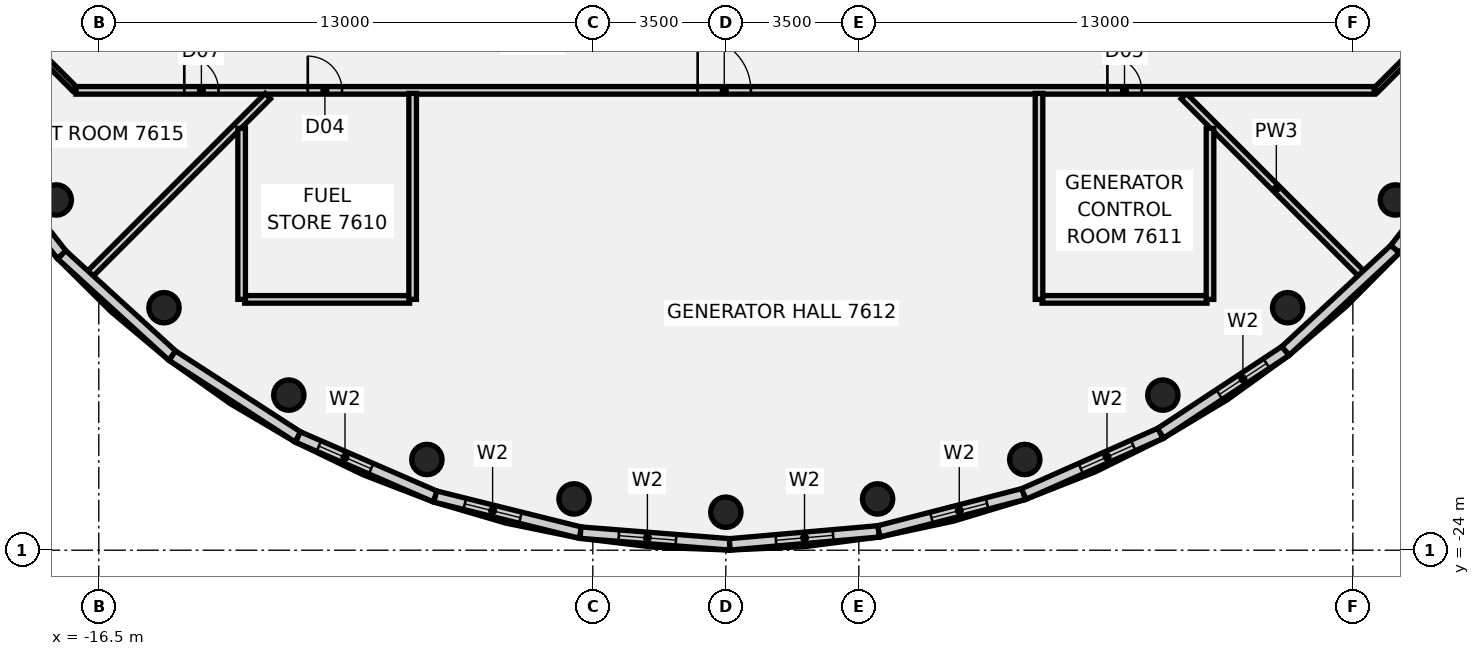
"""IFC4 building model, lengths in metres.
Left out: names, types, materials, properties, quantities, classifications, styles, units other than length and angle.
Written with IfcOpenShell. Run it as: python <this file> out.ifc"""

import sys

from ifc_helpers import new_model, si_unit, direction, frame, frame_2d, origin, origin_2d, place, context, subcontext, project, spatial, rectangle, circle, extrude, element, fill, save


model = new_model("IFC4")
c1 = context("Model", 3, precision=1e-05, world=origin(), true_north=direction((0.0, 1.0)))
c2 = subcontext(c1, "Body", "Model", "MODEL_VIEW")
j1 = project(units=[si_unit("LENGTHUNIT", "METRE"), si_unit("PLANEANGLEUNIT", "RADIAN")], contexts=[c1])
p1 = place(None, origin())
s1 = spatial("IfcSite", under=j1, at=p1, CompositionType="ELEMENT")
p2 = place(p1, origin())
s2 = spatial("IfcBuilding", under=s1, at=p2, CompositionType="ELEMENT")
p3 = place(p2, frame((0.0, 0.0, 309.4)))
s3 = spatial("IfcBuildingStorey", under=s2, at=p3, CompositionType="ELEMENT", Elevation=309.4)
for number, where, z_axis, x_axis in (
    (1, (-17.619, -14.784, -0.18), (0.0, 0.0, 1.0), (1.0, 0.0, 0.0)),
    (2, (-14.784, -17.619, -0.18), (0.0, 0.0, 1.0), (1.0, 0.0, 0.0)),
    (3, (-11.5, -19.919, -0.18), (0.0, 0.0, 1.0), (1.0, 0.0, 0.0)),
    (4, (-7.866, -21.613, -0.18), (0.0, 0.0, 1.0), (1.0, 0.0, 0.0)),
    (5, (-3.994, -22.651, -0.18), (0.0, 0.0, 1.0), (1.0, 0.0, 0.0)),
    (6, (0.0, -23.0, -0.18), (0.0, 0.0, 1.0), (1.0, 0.0, 0.0)),
    (7, (3.994, -22.651, -0.18), (0.0, 0.0, 1.0), (1.0, 0.0, 0.0)),
    (8, (7.866, -21.613, -0.18), (0.0, 0.0, 1.0), (1.0, 0.0, 0.0)),
    (9, (11.5, -19.919, -0.18), (0.0, 0.0, 1.0), (1.0, 0.0, 0.0)),
    (10, (14.784, -17.619, -0.18), (0.0, 0.0, 1.0), (1.0, 0.0, 0.0)),
    (11, (17.619, -14.784, -0.18), (0.0, 0.0, 1.0), (1.0, 0.0, 0.0)),
):
    element("IfcColumn", number, at=place(p3, frame(where, z_axis=z_axis, x_axis=x_axis)), inside=s3, PredefinedType="COLUMN", context=c2, shape_type="SweptSolid", body=[
        extrude(circle(Radius=0.4, at=origin_2d()), origin(), (0.0, 0.0, 1.0), 4.0),
    ])
p4 = place(p3, frame((-18.872, -10.128, 0.0), z_axis=(0.0, 0.0, 1.0), x_axis=(0.707106781187, -0.707106781187, 0.0)))
e12 = element("IfcWall", 12, at=p4, inside=s3, PredefinedType="PARTITIONING", context=c2, shape_type="SweptSolid", body=[
    extrude(rectangle(XDim=2.455, YDim=0.15, at=frame_2d((1.228, 0.0))), origin(), (0.0, 0.0, 1.0), 3.22),
])
p5 = place(p3, frame((12.052, -12.052, 0.0), z_axis=(0.0, 0.0, 1.0), x_axis=(0.707106781187, -0.707106781187, 0.0)))
e13 = element("IfcWall", 13, at=p5, inside=s3, PredefinedType="PARTITIONING", context=c2, shape_type="SweptSolid", body=[
    extrude(rectangle(XDim=6.886, YDim=0.2, at=frame_2d((3.443, 0.0))), origin(), (0.0, 0.0, 1.0), 3.22),
])
p6 = place(p3, frame((-17.1, -11.9, 0.0), z_axis=(0.0, 0.0, 1.0), x_axis=(1.0, 0.0, 0.0)))
e14 = element("IfcWall", 14, at=p6, inside=s3, PredefinedType="PARTITIONING", context=c2, shape_type="SweptSolid", body=[
    extrude(rectangle(XDim=34.165, YDim=0.2, at=frame_2d((17.083, 0.0))), origin(), (0.0, 0.0, 1.0), 3.22),
])
p7 = place(p6, frame((6.1, 0.0, 0.0)))
e15 = element("IfcOpeningElement", 15, at=p7, cuts=e14, PredefinedType="OPENING", context=c2, shape_type="SweptSolid", body=[
    extrude(rectangle(XDim=0.9, YDim=2.1, at=frame_2d((0.45, 1.05))), frame((0.0, 0.11, 0.0), z_axis=(0.0, -1.0, 0.0), x_axis=(1.0, 0.0, 0.0)), (0.0, 0.0, 1.0), 0.22),
])
p8 = place(p6, frame((27.141, 0.0, 0.0)))
e16 = element("IfcOpeningElement", 16, at=p8, cuts=e14, PredefinedType="OPENING", context=c2, shape_type="SweptSolid", body=[
    extrude(rectangle(XDim=0.9, YDim=2.1, at=frame_2d((0.45, 1.05))), frame((0.0, 0.11, 0.0), z_axis=(0.0, -1.0, 0.0), x_axis=(1.0, 0.0, 0.0)), (0.0, 0.0, 1.0), 0.22),
])
p9 = place(p6, frame((16.359, 0.0, 0.0)))
e17 = element("IfcOpeningElement", 17, at=p9, cuts=e14, PredefinedType="OPENING", context=c2, shape_type="SweptSolid", body=[
    extrude(rectangle(XDim=1.4, YDim=2.1, at=frame_2d((0.7, 1.05))), frame((0.0, 0.11, 0.0), z_axis=(0.0, -1.0, 0.0), x_axis=(1.0, 0.0, 0.0)), (0.0, 0.0, 1.0), 0.22),
])
p10 = place(p6, frame((2.85, 0.0, 0.0)))
e18 = element("IfcOpeningElement", 18, at=p10, cuts=e14, PredefinedType="OPENING", context=c2, shape_type="SweptSolid", body=[
    extrude(rectangle(XDim=0.9, YDim=2.1, at=frame_2d((0.45, 1.05))), frame((0.0, 0.11, 0.0), z_axis=(0.0, -1.0, 0.0), x_axis=(1.0, 0.0, 0.0)), (0.0, 0.0, 1.0), 0.22),
])
for number, where, z_axis, x_axis in (
    (19, (-12.661, -17.4, 0.0), (0.0, 0.0, 1.0), (1.0, 0.0, 0.0)),
    (20, (8.321, -17.4, 0.0), (0.0, 0.0, 1.0), (1.0, 0.0, 0.0)),
):
    element("IfcWall", number, at=place(p3, frame(where, z_axis=z_axis, x_axis=x_axis)), inside=s3, PredefinedType="PARTITIONING", context=c2, shape_type="SweptSolid", body=[
        extrude(rectangle(XDim=4.34, YDim=0.2, at=frame_2d((2.17, 0.0))), origin(), (0.0, 0.0, 1.0), 3.22),
    ])
p11 = place(p3, frame((-16.927, -16.927, 0.0), z_axis=(0.0, 0.0, 1.0), x_axis=(0.707106781187, 0.707106781187, 0.0)))
e21 = element("IfcWall", 21, at=p11, inside=s3, PredefinedType="PARTITIONING", context=c2, shape_type="SweptSolid", body=[
    extrude(rectangle(XDim=6.894, YDim=0.2, at=frame_2d((3.447, 0.0))), origin(), (0.0, 0.0, 1.0), 3.22),
])
p12 = place(p3, frame((17.1, -11.9, 0.0), z_axis=(0.0, 0.0, 1.0), x_axis=(0.707106781187, 0.707106781187, 0.0)))
e22 = element("IfcWall", 22, at=p12, inside=s3, PredefinedType="PARTITIONING", context=c2, shape_type="SweptSolid", body=[
    extrude(rectangle(XDim=2.505, YDim=0.15, at=frame_2d((1.253, 0.0))), origin(), (0.0, 0.0, 1.0), 3.22),
])
p13 = place(p3, frame((-12.741, -17.4, 0.0), z_axis=(0.0, 0.0, 1.0), x_axis=(0.0, 1.0, 0.0)))
e23 = element("IfcWall", 23, at=p13, inside=s3, PredefinedType="PARTITIONING", context=c2, shape_type="SweptSolid", body=[
    extrude(rectangle(XDim=4.499, YDim=0.2, at=frame_2d((2.25, 0.0))), origin(), (0.0, 0.0, 1.0), 3.22),
])
for number, where, z_axis, x_axis in (
    (24, (-8.241, -17.4, 0.0), (0.0, 0.0, 1.0), (0.0, 1.0, 0.0)),
    (25, (8.241, -17.4, 0.0), (0.0, 0.0, 1.0), (0.0, 1.0, 0.0)),
):
    element("IfcWall", number, at=place(p3, frame(where, z_axis=z_axis, x_axis=x_axis)), inside=s3, PredefinedType="PARTITIONING", context=c2, shape_type="SweptSolid", body=[
        extrude(rectangle(XDim=5.42, YDim=0.2, at=frame_2d((2.71, 0.0))), origin(), (0.0, 0.0, 1.0), 3.22),
    ])
p14 = place(p3, frame((12.741, -17.4, 0.0), z_axis=(0.0, 0.0, 1.0), x_axis=(0.0, 1.0, 0.0)))
e26 = element("IfcWall", 26, at=p14, inside=s3, PredefinedType="PARTITIONING", context=c2, shape_type="SweptSolid", body=[
    extrude(rectangle(XDim=4.499, YDim=0.2, at=frame_2d((2.25, 0.0))), origin(), (0.0, 0.0, 1.0), 3.22),
])
p15 = place(p3, frame((-19.906, -13.128, 0.0), z_axis=(0.0, 0.0, 1.0), x_axis=(0.617577851206, -0.786509756901, 0.0)))
e27 = element("IfcWall", 27, at=p15, inside=s3, PredefinedType="SOLIDWALL", context=c2, shape_type="SweptSolid", body=[
    extrude(rectangle(XDim=3.938, YDim=0.3, at=frame_2d((1.969, 0.0))), origin(), (0.0, 0.0, 1.0), 3.82),
])
p16 = place(p3, frame((-17.474, -16.226, 0.0), z_axis=(0.0, 0.0, 1.0), x_axis=(0.738634435884, -0.674106200926, 0.0)))
e28 = element("IfcWall", 28, at=p16, inside=s3, PredefinedType="SOLIDWALL", context=c2, shape_type="SweptSolid", body=[
    extrude(rectangle(XDim=3.938, YDim=0.3, at=frame_2d((1.969, 0.0))), origin(), (0.0, 0.0, 1.0), 3.82),
])
p17 = place(p3, frame((-14.565, -18.881, 0.0), z_axis=(0.0, 0.0, 1.0), x_axis=(0.839498632024, -0.54336180104, 0.0)))
e29 = element("IfcWall", 29, at=p17, inside=s3, PredefinedType="SOLIDWALL", context=c2, shape_type="SweptSolid", body=[
    extrude(rectangle(XDim=3.938, YDim=0.3, at=frame_2d((1.969, 0.0))), origin(), (0.0, 0.0, 1.0), 3.82),
])
p18 = place(p3, frame((-11.259, -21.021, 0.0), z_axis=(0.0, 0.0, 1.0), x_axis=(0.917505110173, -0.397723990735, 0.0)))
e30 = element("IfcWall", 30, at=p18, inside=s3, PredefinedType="SOLIDWALL", context=c2, shape_type="SweptSolid", body=[
    extrude(rectangle(XDim=3.938, YDim=0.3, at=frame_2d((1.969, 0.0))), origin(), (0.0, 0.0, 1.0), 3.82),
])
p19 = place(p18, frame((0.6, 0.0, 1.4)))
e31 = element("IfcOpeningElement", 31, at=p19, cuts=e30, PredefinedType="OPENING", context=c2, shape_type="SweptSolid", body=[
    extrude(rectangle(XDim=1.498, YDim=2.12, at=frame_2d((0.749, 1.06))), frame((0.0, 0.16, 0.0), z_axis=(0.0, -1.0, 0.0), x_axis=(1.0, 0.0, 0.0)), (0.0, 0.0, 1.0), 0.32),
])
p20 = place(p3, frame((-7.646, -22.587, 0.0), z_axis=(0.0, 0.0, 1.0), x_axis=(0.970440788586, -0.241339337547, 0.0)))
e32 = element("IfcWall", 32, at=p20, inside=s3, PredefinedType="SOLIDWALL", context=c2, shape_type="SweptSolid", body=[
    extrude(rectangle(XDim=3.938, YDim=0.3, at=frame_2d((1.969, 0.0))), origin(), (0.0, 0.0, 1.0), 3.82),
])
p21 = place(p20, frame((0.801, 0.0, 1.4)))
e33 = element("IfcOpeningElement", 33, at=p21, cuts=e32, PredefinedType="OPENING", context=c2, shape_type="SweptSolid", body=[
    extrude(rectangle(XDim=1.509, YDim=2.12, at=frame_2d((0.754, 1.06))), frame((0.0, 0.16, 0.0), z_axis=(0.0, -1.0, 0.0), x_axis=(1.0, 0.0, 0.0)), (0.0, 0.0, 1.0), 0.32),
])
p22 = place(p3, frame((-3.824, -23.537, 0.0), z_axis=(0.0, 0.0, 1.0), x_axis=(0.996930318741, -0.078293930641, 0.0)))
e34 = element("IfcWall", 34, at=p22, inside=s3, PredefinedType="SOLIDWALL", context=c2, shape_type="SweptSolid", body=[
    extrude(rectangle(XDim=3.938, YDim=0.3, at=frame_2d((1.969, 0.0))), origin(), (0.0, 0.0, 1.0), 3.82),
])
p23 = place(p22, frame((1.011, 0.0, 1.4)))
e35 = element("IfcOpeningElement", 35, at=p23, cuts=e34, PredefinedType="OPENING", context=c2, shape_type="SweptSolid", body=[
    extrude(rectangle(XDim=1.509, YDim=2.12, at=frame_2d((0.754, 1.06))), frame((0.0, 0.16, 0.0), z_axis=(0.0, -1.0, 0.0), x_axis=(1.0, 0.0, 0.0)), (0.0, 0.0, 1.0), 0.32),
])
p24 = place(p3, frame((0.103, -23.846, 0.0), z_axis=(0.0, 0.0, 1.0), x_axis=(0.99621635874, 0.08690780505, 0.0)))
e36 = element("IfcWall", 36, at=p24, inside=s3, PredefinedType="SOLIDWALL", context=c2, shape_type="SweptSolid", body=[
    extrude(rectangle(XDim=3.938, YDim=0.3, at=frame_2d((1.969, 0.0))), origin(), (0.0, 0.0, 1.0), 3.82),
])
p25 = place(p24, frame((1.221, 0.0, 1.4)))
e37 = element("IfcOpeningElement", 37, at=p25, cuts=e36, PredefinedType="OPENING", context=c2, shape_type="SweptSolid", body=[
    extrude(rectangle(XDim=1.509, YDim=2.12, at=frame_2d((0.755, 1.06))), frame((0.0, 0.16, 0.0), z_axis=(0.0, -1.0, 0.0), x_axis=(1.0, 0.0, 0.0)), (0.0, 0.0, 1.0), 0.32),
])
p26 = place(p3, frame((4.026, -23.503, 0.0), z_axis=(0.0, 0.0, 1.0), x_axis=(0.968336809904, 0.24964739651, 0.0)))
e38 = element("IfcWall", 38, at=p26, inside=s3, PredefinedType="SOLIDWALL", context=c2, shape_type="SweptSolid", body=[
    extrude(rectangle(XDim=3.938, YDim=0.3, at=frame_2d((1.969, 0.0))), origin(), (0.0, 0.0, 1.0), 3.82),
])
p27 = place(p26, frame((1.432, 0.0, 1.4)))
e39 = element("IfcOpeningElement", 39, at=p27, cuts=e38, PredefinedType="OPENING", context=c2, shape_type="SweptSolid", body=[
    extrude(rectangle(XDim=1.509, YDim=2.12, at=frame_2d((0.754, 1.06))), frame((0.0, 0.16, 0.0), z_axis=(0.0, -1.0, 0.0), x_axis=(1.0, 0.0, 0.0)), (0.0, 0.0, 1.0), 0.32),
])
p28 = place(p3, frame((7.84, -22.52, 0.0), z_axis=(0.0, 0.0, 1.0), x_axis=(0.91404912862, 0.405603489221, 0.0)))
e40 = element("IfcWall", 40, at=p28, inside=s3, PredefinedType="SOLIDWALL", context=c2, shape_type="SweptSolid", body=[
    extrude(rectangle(XDim=3.938, YDim=0.3, at=frame_2d((1.969, 0.0))), origin(), (0.0, 0.0, 1.0), 3.82),
])
p29 = place(p28, frame((1.643, 0.0, 1.4)))
e41 = element("IfcOpeningElement", 41, at=p29, cuts=e40, PredefinedType="OPENING", context=c2, shape_type="SweptSolid", body=[
    extrude(rectangle(XDim=1.509, YDim=2.12, at=frame_2d((0.754, 1.06))), frame((0.0, 0.16, 0.0), z_axis=(0.0, -1.0, 0.0), x_axis=(1.0, 0.0, 0.0)), (0.0, 0.0, 1.0), 0.32),
])
p30 = place(p3, frame((11.439, -20.923, 0.0), z_axis=(0.0, 0.0, 1.0), x_axis=(0.834786621205, 0.550573607302, 0.0)))
e42 = element("IfcWall", 42, at=p30, inside=s3, PredefinedType="SOLIDWALL", context=c2, shape_type="SweptSolid", body=[
    extrude(rectangle(XDim=3.938, YDim=0.3, at=frame_2d((1.969, 0.0))), origin(), (0.0, 0.0, 1.0), 3.82),
])
p31 = place(p30, frame((1.853, 0.0, 1.4)))
e43 = element("IfcOpeningElement", 43, at=p31, cuts=e42, PredefinedType="OPENING", context=c2, shape_type="SweptSolid", body=[
    extrude(rectangle(XDim=1.485, YDim=2.12, at=frame_2d((0.743, 1.06))), frame((0.0, 0.16, 0.0), z_axis=(0.0, -1.0, 0.0), x_axis=(1.0, 0.0, 0.0)), (0.0, 0.0, 1.0), 0.32),
])
p32 = place(p3, frame((14.727, -18.754, 0.0), z_axis=(0.0, 0.0, 1.0), x_axis=(0.732813362883, 0.680429698926, 0.0)))
e44 = element("IfcWall", 44, at=p32, inside=s3, PredefinedType="SOLIDWALL", context=c2, shape_type="SweptSolid", body=[
    extrude(rectangle(XDim=3.938, YDim=0.3, at=frame_2d((1.969, 0.0))), origin(), (0.0, 0.0, 1.0), 3.82),
])
p33 = place(p3, frame((17.613, -16.075, 0.0), z_axis=(0.0, 0.0, 1.0), x_axis=(0.610785688376, 0.79179596038, 0.0)))
e45 = element("IfcWall", 45, at=p33, inside=s3, PredefinedType="SOLIDWALL", context=c2, shape_type="SweptSolid", body=[
    extrude(rectangle(XDim=3.938, YDim=0.3, at=frame_2d((1.969, 0.0))), origin(), (0.0, 0.0, 1.0), 3.82),
])
p34 = place(p7, frame((0.9, 0.0, 0.0), z_axis=(0.0, 0.0, 1.0), x_axis=(-1.0, 0.0, 0.0)))
e46 = element("IfcDoor", 46, at=p34, inside=s3, OperationType="SINGLE_SWING_LEFT", PredefinedType="DOOR", context=c2, shape_type="SweptSolid", body=[
    extrude(rectangle(XDim=0.9, YDim=2.1, at=frame_2d((0.45, 1.05))), frame((0.0, 0.025, 0.0), z_axis=(0.0, -1.0, 0.0), x_axis=(1.0, 0.0, 0.0)), (0.0, 0.0, 1.0), 0.05),
])
fill(e15, e46)
p35 = place(p8, frame((0.9, 0.0, 0.0), z_axis=(0.0, 0.0, 1.0), x_axis=(-1.0, 0.0, 0.0)))
e47 = element("IfcDoor", 47, at=p35, inside=s3, OperationType="SINGLE_SWING_RIGHT", PredefinedType="DOOR", context=c2, shape_type="SweptSolid", body=[
    extrude(rectangle(XDim=0.9, YDim=2.1, at=frame_2d((0.45, 1.05))), frame((0.0, 0.025, 0.0), z_axis=(0.0, -1.0, 0.0), x_axis=(1.0, 0.0, 0.0)), (0.0, 0.0, 1.0), 0.05),
])
fill(e16, e47)
p36 = place(p9, frame((1.4, 0.0, 0.0), z_axis=(0.0, 0.0, 1.0), x_axis=(-1.0, 0.0, 0.0)))
e48 = element("IfcDoor", 48, at=p36, inside=s3, OperationType="DOUBLE_DOOR_SINGLE_SWING", PredefinedType="DOOR", context=c2, shape_type="SweptSolid", body=[
    extrude(rectangle(XDim=1.4, YDim=2.1, at=frame_2d((0.7, 1.05))), frame((0.0, 0.025, 0.0), z_axis=(0.0, -1.0, 0.0), x_axis=(1.0, 0.0, 0.0)), (0.0, 0.0, 1.0), 0.05),
])
fill(e17, e48)
p37 = place(p10, frame((0.9, 0.0, 0.0), z_axis=(0.0, 0.0, 1.0), x_axis=(-1.0, 0.0, 0.0)))
e49 = element("IfcDoor", 49, at=p37, inside=s3, OperationType="SINGLE_SWING_LEFT", PredefinedType="DOOR", context=c2, shape_type="SweptSolid", body=[
    extrude(rectangle(XDim=0.9, YDim=2.1, at=frame_2d((0.45, 1.05))), frame((0.0, 0.025, 0.0), z_axis=(0.0, -1.0, 0.0), x_axis=(1.0, 0.0, 0.0)), (0.0, 0.0, 1.0), 0.05),
])
fill(e18, e49)
p38 = place(p19, origin())
e50 = element("IfcWindow", 50, at=p38, inside=s3, PartitioningType="SINGLE_PANEL", PredefinedType="WINDOW", context=c2, shape_type="SweptSolid", body=[
    extrude(rectangle(XDim=1.498, YDim=2.12, at=frame_2d((0.749, 1.06))), frame((0.0, 0.03, 0.0), z_axis=(0.0, -1.0, 0.0), x_axis=(1.0, 0.0, 0.0)), (0.0, 0.0, 1.0), 0.06),
])
fill(e31, e50)
p39 = place(p21, origin())
e51 = element("IfcWindow", 51, at=p39, inside=s3, PartitioningType="SINGLE_PANEL", PredefinedType="WINDOW", context=c2, shape_type="SweptSolid", body=[
    extrude(rectangle(XDim=1.509, YDim=2.12, at=frame_2d((0.754, 1.06))), frame((0.0, 0.03, 0.0), z_axis=(0.0, -1.0, 0.0), x_axis=(1.0, 0.0, 0.0)), (0.0, 0.0, 1.0), 0.06),
])
fill(e33, e51)
p40 = place(p23, origin())
e52 = element("IfcWindow", 52, at=p40, inside=s3, PartitioningType="SINGLE_PANEL", PredefinedType="WINDOW", context=c2, shape_type="SweptSolid", body=[
    extrude(rectangle(XDim=1.509, YDim=2.12, at=frame_2d((0.754, 1.06))), frame((0.0, 0.03, 0.0), z_axis=(0.0, -1.0, 0.0), x_axis=(1.0, 0.0, 0.0)), (0.0, 0.0, 1.0), 0.06),
])
fill(e35, e52)
p41 = place(p25, origin())
e53 = element("IfcWindow", 53, at=p41, inside=s3, PartitioningType="SINGLE_PANEL", PredefinedType="WINDOW", context=c2, shape_type="SweptSolid", body=[
    extrude(rectangle(XDim=1.509, YDim=2.12, at=frame_2d((0.755, 1.06))), frame((0.0, 0.03, 0.0), z_axis=(0.0, -1.0, 0.0), x_axis=(1.0, 0.0, 0.0)), (0.0, 0.0, 1.0), 0.06),
])
fill(e37, e53)
p42 = place(p27, origin())
e54 = element("IfcWindow", 54, at=p42, inside=s3, PartitioningType="SINGLE_PANEL", PredefinedType="WINDOW", context=c2, shape_type="SweptSolid", body=[
    extrude(rectangle(XDim=1.509, YDim=2.12, at=frame_2d((0.754, 1.06))), frame((0.0, 0.03, 0.0), z_axis=(0.0, -1.0, 0.0), x_axis=(1.0, 0.0, 0.0)), (0.0, 0.0, 1.0), 0.06),
])
fill(e39, e54)
p43 = place(p29, origin())
e55 = element("IfcWindow", 55, at=p43, inside=s3, PartitioningType="SINGLE_PANEL", PredefinedType="WINDOW", context=c2, shape_type="SweptSolid", body=[
    extrude(rectangle(XDim=1.509, YDim=2.12, at=frame_2d((0.754, 1.06))), frame((0.0, 0.03, 0.0), z_axis=(0.0, -1.0, 0.0), x_axis=(1.0, 0.0, 0.0)), (0.0, 0.0, 1.0), 0.06),
])
fill(e41, e55)
p44 = place(p31, origin())
e56 = element("IfcWindow", 56, at=p44, inside=s3, PartitioningType="SINGLE_PANEL", PredefinedType="WINDOW", context=c2, shape_type="SweptSolid", body=[
    extrude(rectangle(XDim=1.485, YDim=2.12, at=frame_2d((0.743, 1.06))), frame((0.0, 0.03, 0.0), z_axis=(0.0, -1.0, 0.0), x_axis=(1.0, 0.0, 0.0)), (0.0, 0.0, 1.0), 0.06),
])
fill(e43, e56)
save(model, sys.argv[1])
